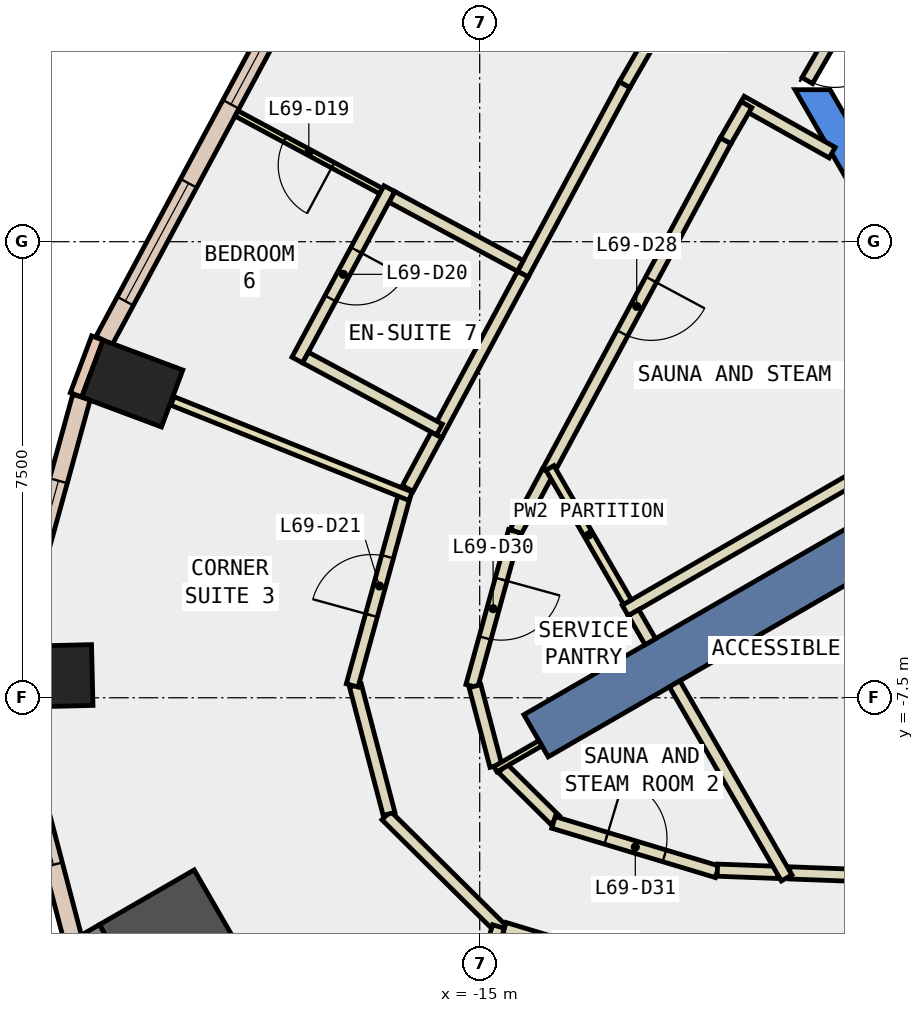
"""IFC4 building model, lengths in metres.
Left out: names, types, materials, properties, quantities, classifications, styles, units other than length and angle.
Written with IfcOpenShell. Run it as: python <this file> out.ifc"""

import sys

from ifc_helpers import new_model, si_unit, direction, frame, frame_2d, origin, origin_2d, place, context, subcontext, project, spatial, polyline, rectangle, outline, extrude, element, fill, save


model = new_model("IFC4")
c1 = context("Model", 3, precision=1e-05, world=origin(), true_north=direction((0.0, 1.0)))
c2 = subcontext(c1, "Body", "Model", "MODEL_VIEW")
j1 = project(units=[si_unit("LENGTHUNIT", "METRE"), si_unit("PLANEANGLEUNIT", "RADIAN")], contexts=[c1])
p1 = place(None, origin())
s1 = spatial("IfcSite", under=j1, at=p1, CompositionType="ELEMENT")
p2 = place(p1, origin())
s2 = spatial("IfcBuilding", under=s1, at=p2, CompositionType="ELEMENT")
p3 = place(p2, frame((0.0, 0.0, 297.2)))
s3 = spatial("IfcBuildingStorey", under=s2, at=p3, CompositionType="ELEMENT", Elevation=297.2)
for number, where, z_axis, x_axis in (
    (1, (-20.714, -2.333, -0.34), (0.0, 0.0, 1.0), (0.351, 0.936, 0.0)),
    (2, (-22.072, -7.143, -0.34), (0.0, 0.0, 1.0), (-0.024, 1.0, 0.0)),
):
    element("IfcColumn", number, at=place(p3, frame(where, z_axis=z_axis, x_axis=x_axis)), inside=s3, PredefinedType="COLUMN", context=c2, shape_type="SweptSolid", body=[
        extrude(rectangle(XDim=1.0, YDim=1.4, at=origin_2d()), origin(), (0.0, 0.0, 1.0), 3.6),
    ])
for number, where, z_axis, x_axis in (
    (3, (-20.025, -11.561, -0.34), (0.0, 0.0, 1.0), (0.866, 0.5, 0.0)),
    (4, (-21.584, -12.461, -0.34), (0.0, 0.0, 1.0), (0.866, 0.5, 0.0)),
):
    element("IfcColumn", number, at=place(p3, frame(where, z_axis=z_axis, x_axis=x_axis)), inside=s3, PredefinedType="COLUMN", context=c2, shape_type="SweptSolid", body=[
        extrude(rectangle(XDim=1.8, YDim=1.8, at=origin_2d()), origin(), (0.0, 0.0, 1.0), 3.6),
    ])
p4 = place(p3, frame((0.0, 0.0, -0.34)))
e5 = element("IfcWall", 5, at=p4, inside=s3, PredefinedType="SHEAR", context=c2, shape_type="SweptSolid", body=[
    extrude(outline(polyline([(-9.815, 2.5), (-4.907, -6.0), (-4.619, -5.5), (-9.238, 2.5), (-9.815, 2.5)])), origin(), (0.0, 0.0, 1.0), 3.6),
])
p5 = place(p3, frame((-6.279, -3.625, -0.34), z_axis=(0.0, 0.0, 1.0), x_axis=(-0.866017533419, -0.500013631625, 0.0)))
e6 = element("IfcWall", 6, at=p5, inside=s3, PredefinedType="SHEAR", context=c2, shape_type="SweptSolid", body=[
    extrude(rectangle(XDim=9.0, YDim=0.8, at=frame_2d((4.5, 0.0))), origin(), (0.0, 0.0, 1.0), 3.6),
])
p6 = place(p3, frame((-21.288, -1.584, 0.0), z_axis=(0.0, 0.0, 1.0), x_axis=(-0.350962844851, -0.936389385637, 0.0)))
e7 = element("IfcWall", 7, at=p6, inside=s3, PredefinedType="STANDARD", context=c2, shape_type="SweptSolid", body=[
    extrude(rectangle(XDim=1.0, YDim=0.2, at=frame_2d((0.5, 0.0))), origin(), (0.0, 0.0, 1.0), 3.26),
])
p7 = place(p3, frame((-17.701, 4.845, 0.0), z_axis=(0.0, 0.0, 1.0), x_axis=(-0.473225522632, -0.880941317415, 0.0)))
e8 = element("IfcWall", 8, at=p7, inside=s3, PredefinedType="STANDARD", context=c2, shape_type="SweptSolid", body=[
    extrude(rectangle(XDim=7.345, YDim=0.3, at=frame_2d((3.673, 0.0))), origin(), (0.0, 0.0, 1.0), 3.26),
])
p8 = place(p7, frame((0.736, 0.0, 0.9)))
e9 = element("IfcOpeningElement", 9, at=p8, cuts=e8, PredefinedType="OPENING", context=c2, shape_type="SweptSolid", body=[
    extrude(rectangle(XDim=2.2, YDim=2.0, at=frame_2d((1.1, 1.0))), frame((0.0, 0.16, 0.0), z_axis=(0.0, -1.0, 0.0), x_axis=(1.0, 0.0, 0.0)), (0.0, 0.0, 1.0), 0.32),
])
p9 = place(p7, frame((4.409, 0.0, 0.9)))
e10 = element("IfcOpeningElement", 10, at=p9, cuts=e8, PredefinedType="OPENING", context=c2, shape_type="SweptSolid", body=[
    extrude(rectangle(XDim=2.2, YDim=2.0, at=frame_2d((1.1, 1.0))), frame((0.0, 0.16, 0.0), z_axis=(0.0, -1.0, 0.0), x_axis=(1.0, 0.0, 0.0)), (0.0, 0.0, 1.0), 0.32),
])
p10 = place(p3, frame((-21.549, -2.553, 0.0), z_axis=(0.0, 0.0, 1.0), x_axis=(-0.264892613927, -0.964277917971, 0.0)))
e11 = element("IfcWall", 11, at=p10, inside=s3, PredefinedType="STANDARD", context=c2, shape_type="SweptSolid", body=[
    extrude(rectangle(XDim=4.258, YDim=0.3, at=frame_2d((2.129, 0.0))), origin(), (0.0, 0.0, 1.0), 3.26),
])
p11 = place(p10, frame((1.429, 0.0, 0.9)))
e12 = element("IfcOpeningElement", 12, at=p11, cuts=e11, PredefinedType="OPENING", context=c2, shape_type="SweptSolid", body=[
    extrude(rectangle(XDim=1.4, YDim=2.0, at=frame_2d((0.7, 1.0))), frame((0.0, 0.16, 0.0), z_axis=(0.0, -1.0, 0.0), x_axis=(1.0, 0.0, 0.0)), (0.0, 0.0, 1.0), 0.32),
])
p12 = place(p3, frame((-22.688, -7.657, 0.0), z_axis=(0.0, 0.0, 1.0), x_axis=(0.253402039956, -0.96736105263, 0.0)))
e13 = element("IfcWall", 13, at=p12, inside=s3, PredefinedType="STANDARD", context=c2, shape_type="SweptSolid", body=[
    extrude(rectangle(XDim=3.954, YDim=0.3, at=frame_2d((1.977, 0.0))), origin(), (0.0, 0.0, 1.0), 3.26),
])
p13 = place(p12, frame((1.277, 0.0, 0.9)))
e14 = element("IfcOpeningElement", 14, at=p13, cuts=e13, PredefinedType="OPENING", context=c2, shape_type="SweptSolid", body=[
    extrude(rectangle(XDim=1.4, YDim=2.0, at=frame_2d((0.7, 1.0))), frame((0.0, 0.16, 0.0), z_axis=(0.0, -1.0, 0.0), x_axis=(1.0, 0.0, 0.0)), (0.0, 0.0, 1.0), 0.32),
])
p14 = place(p3, frame((-9.203, 1.465, 0.0), z_axis=(0.0, 0.0, 1.0), x_axis=(-0.872243753731, 0.489071399775, 0.0)))
e15 = element("IfcWall", 15, at=p14, inside=s3, PredefinedType="PARTITIONING", context=c2, shape_type="SweptSolid", body=[
    extrude(rectangle(XDim=1.715, YDim=0.2, at=frame_2d((0.858, 0.0))), origin(), (0.0, 0.0, 1.0), 3.26),
])
p15 = place(p3, frame((-10.612, 2.255, 0.0), z_axis=(0.0, 0.0, 1.0), x_axis=(-0.499916971989, -0.866073334723, 0.0)))
e16 = element("IfcWall", 16, at=p15, inside=s3, PredefinedType="PARTITIONING", context=c2, shape_type="SweptSolid", body=[
    extrude(rectangle(XDim=0.688, YDim=0.2, at=frame_2d((0.344, 0.0))), origin(), (0.0, 0.0, 1.0), 3.26),
])
p16 = place(p3, frame((-10.956, 1.659, 0.0), z_axis=(0.0, 0.0, 1.0), x_axis=(-0.473095976848, -0.881010894762, 0.0)))
e17 = element("IfcWall", 17, at=p16, inside=s3, PredefinedType="PARTITIONING", context=c2, shape_type="SweptSolid", body=[
    extrude(rectangle(XDim=6.18, YDim=0.2, at=frame_2d((3.09, 0.0))), origin(), (0.0, 0.0, 1.0), 3.26),
])
p17 = place(p16, frame((2.59, 0.0, 0.0)))
e18 = element("IfcOpeningElement", 18, at=p17, cuts=e17, PredefinedType="OPENING", context=c2, shape_type="SweptSolid", body=[
    extrude(rectangle(XDim=1.0, YDim=2.1, at=frame_2d((0.5, 1.05))), frame((0.0, 0.11, 0.0), z_axis=(0.0, -1.0, 0.0), x_axis=(1.0, 0.0, 0.0)), (0.0, 0.0, 1.0), 0.22),
])
p18 = place(p3, frame((-9.902, -10.38, 0.0), z_axis=(0.0, 0.0, 1.0), x_axis=(0.999295503749, -0.037529937222, 0.0)))
e19 = element("IfcWall", 19, at=p18, inside=s3, PredefinedType="PARTITIONING", context=c2, shape_type="SweptSolid", body=[
    extrude(rectangle(XDim=2.004, YDim=0.2, at=frame_2d((1.002, 0.0))), origin(), (0.0, 0.0, 1.0), 3.26),
])
p19 = place(p3, frame((-13.88, -3.786, 0.0), z_axis=(0.0, 0.0, 1.0), x_axis=(-0.473500327913, -0.880793641817, 0.0)))
e20 = element("IfcWall", 20, at=p19, inside=s3, PredefinedType="PARTITIONING", context=c2, shape_type="SweptSolid", body=[
    extrude(rectangle(XDim=1.117, YDim=0.2, at=frame_2d((0.559, 0.0))), origin(), (0.0, 0.0, 1.0), 3.26),
])
p20 = place(p3, frame((-14.429, -4.761, 0.0), z_axis=(0.0, 0.0, 1.0), x_axis=(-0.265321869293, -0.964159896321, 0.0)))
e21 = element("IfcWall", 21, at=p20, inside=s3, PredefinedType="PARTITIONING", context=c2, shape_type="SweptSolid", body=[
    extrude(rectangle(XDim=2.642, YDim=0.2, at=frame_2d((1.321, 0.0))), origin(), (0.0, 0.0, 1.0), 3.26),
])
p21 = place(p20, frame((0.821, 0.0, 0.0)))
e22 = element("IfcOpeningElement", 22, at=p21, cuts=e21, PredefinedType="OPENING", context=c2, shape_type="SweptSolid", body=[
    extrude(rectangle(XDim=1.0, YDim=2.1, at=frame_2d((0.5, 1.05))), frame((0.0, 0.11, 0.0), z_axis=(0.0, -1.0, 0.0), x_axis=(1.0, 0.0, 0.0)), (0.0, 0.0, 1.0), 0.22),
])
p22 = place(p3, frame((-15.078, -7.309, 0.0), z_axis=(0.0, 0.0, 1.0), x_axis=(0.254014079025, -0.967200520914, 0.0)))
e23 = element("IfcWall", 23, at=p22, inside=s3, PredefinedType="PARTITIONING", context=c2, shape_type="SweptSolid", body=[
    extrude(rectangle(XDim=1.354, YDim=0.2, at=frame_2d((0.677, 0.0))), origin(), (0.0, 0.0, 1.0), 3.26),
])
p23 = place(p3, frame((-14.62, -8.66, 0.0), z_axis=(0.0, 0.0, 1.0), x_axis=(0.710838137113, -0.703355630407, 0.0)))
e24 = element("IfcWall", 24, at=p23, inside=s3, PredefinedType="PARTITIONING", context=c2, shape_type="SweptSolid", body=[
    extrude(rectangle(XDim=1.207, YDim=0.2, at=frame_2d((0.604, 0.0))), origin(), (0.0, 0.0, 1.0), 3.26),
])
p24 = place(p3, frame((-13.787, -9.55, 0.0), z_axis=(0.0, 0.0, 1.0), x_axis=(0.957493454064, -0.288454997225, 0.0)))
e25 = element("IfcWall", 25, at=p24, inside=s3, PredefinedType="PARTITIONING", context=c2, shape_type="SweptSolid", body=[
    extrude(rectangle(XDim=2.812, YDim=0.2, at=frame_2d((1.406, 0.0))), origin(), (0.0, 0.0, 1.0), 3.26),
])
p25 = place(p24, frame((0.906, 0.0, 0.0)))
e26 = element("IfcOpeningElement", 26, at=p25, cuts=e25, PredefinedType="OPENING", context=c2, shape_type="SweptSolid", body=[
    extrude(rectangle(XDim=1.0, YDim=2.1, at=frame_2d((0.5, 1.05))), frame((0.0, 0.11, 0.0), z_axis=(0.0, -1.0, 0.0), x_axis=(1.0, 0.0, 0.0)), (0.0, 0.0, 1.0), 0.22),
])
p26 = place(p3, frame((-11.091, -10.335, 0.0), z_axis=(0.0, 0.0, 1.0), x_axis=(0.999296807198, -0.037495214686, 0.0)))
e27 = element("IfcWall", 27, at=p26, inside=s3, PredefinedType="PARTITIONING", context=c2, shape_type="SweptSolid", body=[
    extrude(rectangle(XDim=0.99, YDim=0.2, at=frame_2d((0.495, 0.0))), origin(), (0.0, 0.0, 1.0), 3.26),
])
p27 = place(p3, frame((-14.29, -0.533, 0.0), z_axis=(0.0, 0.0, 1.0), x_axis=(0.473161350875, 0.880975786295, 0.0)))
e28 = element("IfcWall", 28, at=p27, inside=s3, PredefinedType="PARTITIONING", context=c2, shape_type="SweptSolid", body=[
    extrude(rectangle(XDim=3.538, YDim=0.2, at=frame_2d((1.769, 0.0))), origin(), (0.0, 0.0, 1.0), 3.26),
])
p28 = place(p3, frame((-12.616, 2.584, 0.0), z_axis=(0.0, 0.0, 1.0), x_axis=(0.50008212199, 0.86597798544, 0.0)))
e29 = element("IfcWall", 29, at=p28, inside=s3, PredefinedType="PARTITIONING", context=c2, shape_type="SweptSolid", body=[
    extrude(rectangle(XDim=3.995, YDim=0.2, at=frame_2d((1.998, 0.0))), origin(), (0.0, 0.0, 1.0), 3.26),
])
p29 = place(p28, frame((1.498, 0.0, 0.0)))
e30 = element("IfcOpeningElement", 30, at=p29, cuts=e29, PredefinedType="OPENING", context=c2, shape_type="SweptSolid", body=[
    extrude(rectangle(XDim=1.0, YDim=2.1, at=frame_2d((0.5, 1.05))), frame((0.0, 0.11, 0.0), z_axis=(0.0, -1.0, 0.0), x_axis=(1.0, 0.0, 0.0)), (0.0, 0.0, 1.0), 0.22),
])
p30 = place(p3, frame((-16.184, -4.059, 0.0), z_axis=(0.0, 0.0, 1.0), x_axis=(0.473039108954, 0.881041430013, 0.0)))
e31 = element("IfcWall", 31, at=p30, inside=s3, PredefinedType="PARTITIONING", context=c2, shape_type="SweptSolid", body=[
    extrude(rectangle(XDim=1.002, YDim=0.2, at=frame_2d((0.501, 0.0))), origin(), (0.0, 0.0, 1.0), 3.26),
])
p31 = place(p3, frame((-15.71, -3.176, 0.0), z_axis=(0.0, 0.0, 1.0), x_axis=(0.473255284848, 0.880925329051, 0.0)))
e32 = element("IfcWall", 32, at=p31, inside=s3, PredefinedType="PARTITIONING", context=c2, shape_type="SweptSolid", body=[
    extrude(rectangle(XDim=3.0, YDim=0.2, at=frame_2d((1.5, 0.0))), origin(), (0.0, 0.0, 1.0), 3.26),
])
p32 = place(p3, frame((-14.62, -11.333, 0.0), z_axis=(0.0, 0.0, 1.0), x_axis=(-0.710808598142, 0.703385482369, 0.0)))
e33 = element("IfcWall", 33, at=p32, inside=s3, PredefinedType="PARTITIONING", context=c2, shape_type="SweptSolid", body=[
    extrude(rectangle(XDim=2.697, YDim=0.2, at=frame_2d((1.349, 0.0))), origin(), (0.0, 0.0, 1.0), 3.26),
])
p33 = place(p3, frame((-16.491, -9.41, 0.0), z_axis=(0.0, 0.0, 1.0), x_axis=(-0.253618393349, 0.967304352598, 0.0)))
e34 = element("IfcWall", 34, at=p33, inside=s3, PredefinedType="PARTITIONING", context=c2, shape_type="SweptSolid", body=[
    extrude(rectangle(XDim=2.184, YDim=0.2, at=frame_2d((1.092, 0.0))), origin(), (0.0, 0.0, 1.0), 3.26),
])
p34 = place(p3, frame((-17.097, -7.297, 0.0), z_axis=(0.0, 0.0, 1.0), x_axis=(0.264861686213, 0.964286413456, 0.0)))
e35 = element("IfcWall", 35, at=p34, inside=s3, PredefinedType="PARTITIONING", context=c2, shape_type="SweptSolid", body=[
    extrude(rectangle(XDim=3.292, YDim=0.2, at=frame_2d((1.646, 0.0))), origin(), (0.0, 0.0, 1.0), 3.26),
])
p35 = place(p34, frame((1.195, 0.0, 0.0)))
e36 = element("IfcOpeningElement", 36, at=p35, cuts=e35, PredefinedType="OPENING", context=c2, shape_type="SweptSolid", body=[
    extrude(rectangle(XDim=1.0, YDim=2.1, at=frame_2d((0.5, 1.05))), frame((0.0, 0.11, 0.0), z_axis=(0.0, -1.0, 0.0), x_axis=(1.0, 0.0, 0.0)), (0.0, 0.0, 1.0), 0.22),
])
p36 = place(p3, frame((-12.968, -11.781, 0.0), z_axis=(0.0, 0.0, 1.0), x_axis=(-0.957517271828, 0.288375925054, 0.0)))
e37 = element("IfcWall", 37, at=p36, inside=s3, PredefinedType="PARTITIONING", context=c2, shape_type="SweptSolid", body=[
    extrude(rectangle(XDim=1.699, YDim=0.2, at=frame_2d((0.85, 0.0))), origin(), (0.0, 0.0, 1.0), 3.26),
])
p37 = place(p3, frame((-6.804, -2.714, 0.0), z_axis=(0.0, 0.0, 1.0), x_axis=(-0.866057565063, -0.499944290893, 0.0)))
e38 = element("IfcWall", 38, at=p37, inside=s3, PredefinedType="PARTITIONING", context=c2, shape_type="SweptSolid", body=[
    extrude(rectangle(XDim=6.7, YDim=0.2, at=frame_2d((3.35, 0.0))), origin(), (0.0, 0.0, 1.0), 3.26),
])
p38 = place(p3, frame((-12.57, -5.927, 0.0), z_axis=(0.0, 0.0, 1.0), x_axis=(-0.500197803108, 0.865911171983, 0.0)))
e39 = element("IfcWall", 39, at=p38, inside=s3, PredefinedType="PARTITIONING", context=c2, shape_type="SweptSolid", body=[
    extrude(rectangle(XDim=2.549, YDim=0.15, at=frame_2d((1.274, 0.0))), origin(), (0.0, 0.0, 1.0), 3.26),
])
p39 = place(p3, frame((-12.194, -6.578, 0.0), z_axis=(0.0, 0.0, 1.0), x_axis=(-0.500809139387, 0.865557742676, 0.0)))
e40 = element("IfcWall", 40, at=p39, inside=s3, PredefinedType="PARTITIONING", context=c2, shape_type="SweptSolid", body=[
    extrude(rectangle(XDim=0.551, YDim=0.2, at=frame_2d((0.275, 0.0))), origin(), (0.0, 0.0, 1.0), 3.26),
])
p40 = place(p3, frame((-9.952, -10.463, 0.0), z_axis=(0.0, 0.0, 1.0), x_axis=(-0.499837150608, 0.866119404512, 0.0)))
e41 = element("IfcWall", 41, at=p40, inside=s3, PredefinedType="PARTITIONING", context=c2, shape_type="SweptSolid", body=[
    extrude(rectangle(XDim=3.685, YDim=0.2, at=frame_2d((1.843, 0.0))), origin(), (0.0, 0.0, 1.0), 3.26),
])
p41 = place(p3, frame((-14.002, -8.248, 0.0), z_axis=(0.0, 0.0, 1.0), x_axis=(-0.866142766235, -0.499796667154, 0.0)))
e42 = element("IfcWall", 42, at=p41, inside=s3, PredefinedType="PARTITIONING", context=c2, shape_type="SweptSolid", body=[
    extrude(rectangle(XDim=0.854, YDim=0.1, at=frame_2d((0.427, 0.0))), origin(), (0.0, 0.0, 1.0), 3.26),
])
p42 = place(p3, frame((-16.621, 0.832, 0.0), z_axis=(0.0, 0.0, 1.0), x_axis=(-0.880914863524, 0.47327476504, 0.0)))
e43 = element("IfcWall", 43, at=p42, inside=s3, PredefinedType="PARTITIONING", context=c2, shape_type="SweptSolid", body=[
    extrude(rectangle(XDim=2.7, YDim=0.1, at=frame_2d((1.35, 0.0))), origin(), (0.0, 0.0, 1.0), 3.26),
])
p43 = place(p42, frame((0.9, 0.0, 0.0)))
e44 = element("IfcOpeningElement", 44, at=p43, cuts=e43, PredefinedType="OPENING", context=c2, shape_type="SweptSolid", body=[
    extrude(rectangle(XDim=0.9, YDim=2.1, at=frame_2d((0.45, 1.05))), frame((0.0, 0.06, 0.0), z_axis=(0.0, -1.0, 0.0), x_axis=(1.0, 0.0, 0.0)), (0.0, 0.0, 1.0), 0.12),
])
p44 = place(p3, frame((-14.331, -0.398, 0.0), z_axis=(0.0, 0.0, 1.0), x_axis=(-0.880875830026, 0.473347411608, 0.0)))
e45 = element("IfcWall", 45, at=p44, inside=s3, PredefinedType="PARTITIONING", context=c2, shape_type="SweptSolid", body=[
    extrude(rectangle(XDim=2.4, YDim=0.2, at=frame_2d((1.2, 0.0))), origin(), (0.0, 0.0, 1.0), 3.26),
])
p45 = place(p3, frame((-16.486, 0.873, 0.0), z_axis=(0.0, 0.0, 1.0), x_axis=(-0.473116768279, -0.88099972961, 0.0)))
e46 = element("IfcWall", 46, at=p45, inside=s3, PredefinedType="PARTITIONING", context=c2, shape_type="SweptSolid", body=[
    extrude(rectangle(XDim=3.2, YDim=0.2, at=frame_2d((1.6, 0.0))), origin(), (0.0, 0.0, 1.0), 3.26),
])
p46 = place(p45, frame((1.15, 0.0, 0.0)))
e47 = element("IfcOpeningElement", 47, at=p46, cuts=e46, PredefinedType="OPENING", context=c2, shape_type="SweptSolid", body=[
    extrude(rectangle(XDim=0.9, YDim=2.1, at=frame_2d((0.45, 1.05))), frame((0.0, 0.11, 0.0), z_axis=(0.0, -1.0, 0.0), x_axis=(1.0, 0.0, 0.0)), (0.0, 0.0, 1.0), 0.22),
])
p47 = place(p3, frame((-17.865, -1.905, 0.0), z_axis=(0.0, 0.0, 1.0), x_axis=(0.881022314299, -0.473074710493, 0.0)))
e48 = element("IfcWall", 48, at=p47, inside=s3, PredefinedType="PARTITIONING", context=c2, shape_type="SweptSolid", body=[
    extrude(rectangle(XDim=2.5, YDim=0.2, at=frame_2d((1.25, 0.0))), origin(), (0.0, 0.0, 1.0), 3.26),
])
p48 = place(p3, frame((-16.138, -4.185, 0.0), z_axis=(0.0, 0.0, 1.0), x_axis=(-0.928432751736, 0.371500505388, 0.0)))
e49 = element("IfcWall", 49, at=p48, inside=s3, PredefinedType="PARTITIONING", context=c2, shape_type="SweptSolid", body=[
    extrude(rectangle(XDim=4.216, YDim=0.15, at=frame_2d((2.108, 0.0))), origin(), (0.0, 0.0, 1.0), 3.26),
])
p49 = place(p3, frame((-14.691, -11.262, 0.0), z_axis=(0.0, 0.0, 1.0), x_axis=(-0.288440595492, -0.95749779262, 0.0)))
e50 = element("IfcWall", 50, at=p49, inside=s3, PredefinedType="PARTITIONING", context=c2, shape_type="SweptSolid", body=[
    extrude(rectangle(XDim=2.5, YDim=0.2, at=frame_2d((1.25, 0.0))), origin(), (0.0, 0.0, 1.0), 3.26),
])
p50 = place(p3, frame((-9.15, 3.452, 0.0), z_axis=(0.0, 0.0, 1.0), x_axis=(-0.500079945886, -0.865979242085, 0.0)))
e51 = element("IfcWall", 51, at=p50, inside=s3, PredefinedType="PARTITIONING", context=c2, shape_type="SweptSolid", body=[
    extrude(rectangle(XDim=0.926, YDim=0.2, at=frame_2d((0.463, 0.0))), origin(), (0.0, 0.0, 1.0), 2.4),
])
p51 = place(p50, frame((0.017, 0.0, 0.0)))
e52 = element("IfcOpeningElement", 52, at=p51, cuts=e51, PredefinedType="OPENING", context=c2, shape_type="SweptSolid", body=[
    extrude(rectangle(XDim=0.9, YDim=2.1, at=frame_2d((0.45, 1.05))), frame((0.0, 0.11, 0.0), z_axis=(0.0, -1.0, 0.0), x_axis=(1.0, 0.0, 0.0)), (0.0, 0.0, 1.0), 0.22),
])
p52 = place(p8, origin())
e53 = element("IfcWindow", 53, at=p52, inside=s3, PartitioningType="SINGLE_PANEL", PredefinedType="WINDOW", context=c2, shape_type="SweptSolid", body=[
    extrude(rectangle(XDim=2.2, YDim=2.0, at=frame_2d((1.1, 1.0))), frame((0.0, 0.03, 0.0), z_axis=(0.0, -1.0, 0.0), x_axis=(1.0, 0.0, 0.0)), (0.0, 0.0, 1.0), 0.06),
])
fill(e9, e53)
p53 = place(p9, origin())
e54 = element("IfcWindow", 54, at=p53, inside=s3, PartitioningType="SINGLE_PANEL", PredefinedType="WINDOW", context=c2, shape_type="SweptSolid", body=[
    extrude(rectangle(XDim=2.2, YDim=2.0, at=frame_2d((1.1, 1.0))), frame((0.0, 0.03, 0.0), z_axis=(0.0, -1.0, 0.0), x_axis=(1.0, 0.0, 0.0)), (0.0, 0.0, 1.0), 0.06),
])
fill(e10, e54)
p54 = place(p11, origin())
e55 = element("IfcWindow", 55, at=p54, inside=s3, PartitioningType="SINGLE_PANEL", PredefinedType="WINDOW", context=c2, shape_type="SweptSolid", body=[
    extrude(rectangle(XDim=1.4, YDim=2.0, at=frame_2d((0.7, 1.0))), frame((0.0, 0.03, 0.0), z_axis=(0.0, -1.0, 0.0), x_axis=(1.0, 0.0, 0.0)), (0.0, 0.0, 1.0), 0.06),
])
fill(e12, e55)
p55 = place(p13, origin())
e56 = element("IfcWindow", 56, at=p55, inside=s3, PartitioningType="SINGLE_PANEL", PredefinedType="WINDOW", context=c2, shape_type="SweptSolid", body=[
    extrude(rectangle(XDim=1.4, YDim=2.0, at=frame_2d((0.7, 1.0))), frame((0.0, 0.03, 0.0), z_axis=(0.0, -1.0, 0.0), x_axis=(1.0, 0.0, 0.0)), (0.0, 0.0, 1.0), 0.06),
])
fill(e14, e56)
p56 = place(p43, origin())
e57 = element("IfcDoor", 57, at=p56, inside=s3, OperationType="SINGLE_SWING_LEFT", PredefinedType="DOOR", context=c2, shape_type="SweptSolid", body=[
    extrude(rectangle(XDim=0.9, YDim=2.1, at=frame_2d((0.45, 1.05))), frame((0.0, 0.025, 0.0), z_axis=(0.0, -1.0, 0.0), x_axis=(1.0, 0.0, 0.0)), (0.0, 0.0, 1.0), 0.05),
])
fill(e44, e57)
p57 = place(p46, origin())
e58 = element("IfcDoor", 58, at=p57, inside=s3, OperationType="SINGLE_SWING_LEFT", PredefinedType="DOOR", context=c2, shape_type="SweptSolid", body=[
    extrude(rectangle(XDim=0.9, YDim=2.1, at=frame_2d((0.45, 1.05))), frame((0.0, 0.025, 0.0), z_axis=(0.0, -1.0, 0.0), x_axis=(1.0, 0.0, 0.0)), (0.0, 0.0, 1.0), 0.05),
])
fill(e47, e58)
p58 = place(p35, origin())
e59 = element("IfcDoor", 59, at=p58, inside=s3, OperationType="SINGLE_SWING_RIGHT", PredefinedType="DOOR", context=c2, shape_type="SweptSolid", body=[
    extrude(rectangle(XDim=1.0, YDim=2.1, at=frame_2d((0.5, 1.05))), frame((0.0, 0.025, 0.0), z_axis=(0.0, -1.0, 0.0), x_axis=(1.0, 0.0, 0.0)), (0.0, 0.0, 1.0), 0.05),
])
fill(e36, e59)
p59 = place(p17, origin())
e60 = element("IfcDoor", 60, at=p59, inside=s3, OperationType="SINGLE_SWING_LEFT", PredefinedType="DOOR", context=c2, shape_type="SweptSolid", body=[
    extrude(rectangle(XDim=1.0, YDim=2.1, at=frame_2d((0.5, 1.05))), frame((0.0, 0.025, 0.0), z_axis=(0.0, -1.0, 0.0), x_axis=(1.0, 0.0, 0.0)), (0.0, 0.0, 1.0), 0.05),
])
fill(e18, e60)
p60 = place(p21, origin())
e61 = element("IfcDoor", 61, at=p60, inside=s3, OperationType="SINGLE_SWING_LEFT", PredefinedType="DOOR", context=c2, shape_type="SweptSolid", body=[
    extrude(rectangle(XDim=1.0, YDim=2.1, at=frame_2d((0.5, 1.05))), frame((0.0, 0.025, 0.0), z_axis=(0.0, -1.0, 0.0), x_axis=(1.0, 0.0, 0.0)), (0.0, 0.0, 1.0), 0.05),
])
fill(e22, e61)
p61 = place(p25, origin())
e62 = element("IfcDoor", 62, at=p61, inside=s3, OperationType="SINGLE_SWING_LEFT", PredefinedType="DOOR", context=c2, shape_type="SweptSolid", body=[
    extrude(rectangle(XDim=1.0, YDim=2.1, at=frame_2d((0.5, 1.05))), frame((0.0, 0.025, 0.0), z_axis=(0.0, -1.0, 0.0), x_axis=(1.0, 0.0, 0.0)), (0.0, 0.0, 1.0), 0.05),
])
fill(e26, e62)
p62 = place(p51, origin())
e63 = element("IfcDoor", 63, at=p62, inside=s3, OperationType="SINGLE_SWING_LEFT", PredefinedType="DOOR", context=c2, shape_type="SweptSolid", body=[
    extrude(rectangle(XDim=0.9, YDim=2.1, at=frame_2d((0.45, 1.05))), frame((0.0, 0.025, 0.0), z_axis=(0.0, -1.0, 0.0), x_axis=(1.0, 0.0, 0.0)), (0.0, 0.0, 1.0), 0.05),
])
fill(e52, e63)
save(model, sys.argv[1])
